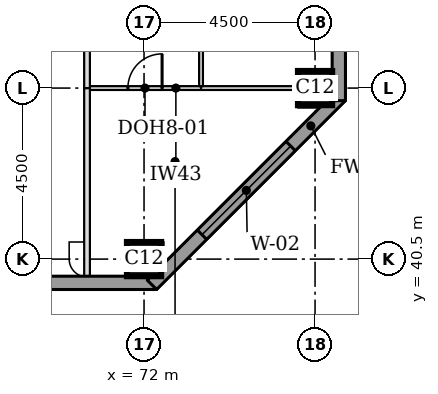
"""IFC4 building model, lengths in metres.
Left out: names, types, materials, properties, quantities, classifications, styles, units other than length and angle.
Written with IfcOpenShell. Run it as: python <this file> out.ifc"""

import sys

from ifc_helpers import new_model, si_unit, direction, frame, frame_2d, origin, origin_2d, place, context, subcontext, project, spatial, rectangle, extrude, element, fill, save


model = new_model("IFC4")
c1 = context("Model", 3, precision=1e-05, world=origin(), true_north=direction((0.0, 1.0)))
c2 = subcontext(c1, "Body", "Model", "MODEL_VIEW")
j1 = project(units=[si_unit("LENGTHUNIT", "METRE"), si_unit("PLANEANGLEUNIT", "RADIAN")], contexts=[c1])
p1 = place(None, origin())
s1 = spatial("IfcSite", under=j1, at=p1, CompositionType="ELEMENT")
p2 = place(p1, origin())
s2 = spatial("IfcBuilding", under=s1, at=p2, CompositionType="ELEMENT")
p3 = place(p2, frame((0.0, 0.0, 199.5)))
s3 = spatial("IfcBuildingStorey", under=s2, at=p3, CompositionType="ELEMENT", Elevation=199.5)
for number, where, z_axis, x_axis in (
    (1, (72.0, 40.5, 0.0), (0.0, 0.0, 1.0), (1.0, 0.0, 0.0)),
    (2, (76.5, 45.0, 0.0), (0.0, 0.0, 1.0), (1.0, 0.0, 0.0)),
):
    element("IfcColumn", number, at=place(p3, frame(where, z_axis=z_axis, x_axis=x_axis)), inside=s3, PredefinedType="COLUMN", context=c2, shape_type="SweptSolid", body=[
        extrude(rectangle(XDim=0.9, YDim=0.9, at=origin_2d()), origin(), (0.0, 0.0, 1.0), 3.7),
    ])
p4 = place(p3, frame((36.0, 39.875, 0.0), z_axis=(0.0, 0.0, 1.0), x_axis=(1.0, 0.0, 0.0)))
e3 = element("IfcWall", 3, at=p4, inside=s3, PredefinedType="STANDARD", context=c2, shape_type="SweptSolid", body=[
    extrude(rectangle(XDim=36.331, YDim=0.35, at=frame_2d((18.166, 0.0))), origin(), (0.0, 0.0, 1.0), 3.525),
])
p5 = place(p4, frame((5.1, 0.0, 0.9)))
e4 = element("IfcOpeningElement", 4, at=p5, cuts=e3, PredefinedType="OPENING", context=c2, shape_type="SweptSolid", body=[
    extrude(rectangle(XDim=3.3, YDim=1.9, at=frame_2d((1.65, 0.95))), frame((0.0, 0.185, 0.0), z_axis=(0.0, -1.0, 0.0), x_axis=(1.0, 0.0, 0.0)), (0.0, 0.0, 1.0), 0.37),
])
p6 = place(p4, frame((9.6, 0.0, 0.9)))
e5 = element("IfcOpeningElement", 5, at=p6, cuts=e3, PredefinedType="OPENING", context=c2, shape_type="SweptSolid", body=[
    extrude(rectangle(XDim=3.3, YDim=1.9, at=frame_2d((1.65, 0.95))), frame((0.0, 0.185, 0.0), z_axis=(0.0, -1.0, 0.0), x_axis=(1.0, 0.0, 0.0)), (0.0, 0.0, 1.0), 0.37),
])
p7 = place(p4, frame((14.1, 0.0, 0.9)))
e6 = element("IfcOpeningElement", 6, at=p7, cuts=e3, PredefinedType="OPENING", context=c2, shape_type="SweptSolid", body=[
    extrude(rectangle(XDim=3.3, YDim=1.9, at=frame_2d((1.65, 0.95))), frame((0.0, 0.185, 0.0), z_axis=(0.0, -1.0, 0.0), x_axis=(1.0, 0.0, 0.0)), (0.0, 0.0, 1.0), 0.37),
])
p8 = place(p4, frame((18.6, 0.0, 0.9)))
e7 = element("IfcOpeningElement", 7, at=p8, cuts=e3, PredefinedType="OPENING", context=c2, shape_type="SweptSolid", body=[
    extrude(rectangle(XDim=3.3, YDim=1.9, at=frame_2d((1.65, 0.95))), frame((0.0, 0.185, 0.0), z_axis=(0.0, -1.0, 0.0), x_axis=(1.0, 0.0, 0.0)), (0.0, 0.0, 1.0), 0.37),
])
p9 = place(p4, frame((23.1, 0.0, 0.9)))
e8 = element("IfcOpeningElement", 8, at=p9, cuts=e3, PredefinedType="OPENING", context=c2, shape_type="SweptSolid", body=[
    extrude(rectangle(XDim=3.3, YDim=1.9, at=frame_2d((1.65, 0.95))), frame((0.0, 0.185, 0.0), z_axis=(0.0, -1.0, 0.0), x_axis=(1.0, 0.0, 0.0)), (0.0, 0.0, 1.0), 0.37),
])
p10 = place(p4, frame((27.6, 0.0, 0.9)))
e9 = element("IfcOpeningElement", 9, at=p10, cuts=e3, PredefinedType="OPENING", context=c2, shape_type="SweptSolid", body=[
    extrude(rectangle(XDim=3.3, YDim=1.9, at=frame_2d((1.65, 0.95))), frame((0.0, 0.185, 0.0), z_axis=(0.0, -1.0, 0.0), x_axis=(1.0, 0.0, 0.0)), (0.0, 0.0, 1.0), 0.37),
])
p11 = place(p3, frame((72.208, 39.824, 0.0), z_axis=(0.0, 0.0, 1.0), x_axis=(0.707106781187, 0.707106781187, 0.0)))
e10 = element("IfcWall", 10, at=p11, inside=s3, PredefinedType="STANDARD", context=c2, shape_type="SweptSolid", body=[
    extrude(rectangle(XDim=7.027, YDim=0.35, at=frame_2d((3.513, 0.0))), origin(), (0.0, 0.0, 1.0), 3.525),
])
p12 = place(p11, frame((1.863, 0.0, 0.9)))
e11 = element("IfcOpeningElement", 11, at=p12, cuts=e10, PredefinedType="OPENING", context=c2, shape_type="SweptSolid", body=[
    extrude(rectangle(XDim=3.3, YDim=1.9, at=frame_2d((1.65, 0.95))), frame((0.0, 0.185, 0.0), z_axis=(0.0, -1.0, 0.0), x_axis=(1.0, 0.0, 0.0)), (0.0, 0.0, 1.0), 0.37),
])
p13 = place(p3, frame((77.125, 44.669, 0.0), z_axis=(0.0, 0.0, 1.0), x_axis=(0.0, 1.0, 0.0)))
e12 = element("IfcWall", 12, at=p13, inside=s3, PredefinedType="STANDARD", context=c2, shape_type="SweptSolid", body=[
    extrude(rectangle(XDim=32.163, YDim=0.35, at=frame_2d((16.081, 0.0))), origin(), (0.0, 0.0, 1.0), 3.525),
])
p14 = place(p13, frame((5.431, 0.0, 0.9)))
e13 = element("IfcOpeningElement", 13, at=p14, cuts=e12, PredefinedType="OPENING", context=c2, shape_type="SweptSolid", body=[
    extrude(rectangle(XDim=3.3, YDim=1.9, at=frame_2d((1.65, 0.95))), frame((0.0, 0.185, 0.0), z_axis=(0.0, -1.0, 0.0), x_axis=(1.0, 0.0, 0.0)), (0.0, 0.0, 1.0), 0.37),
])
p15 = place(p13, frame((9.931, 0.0, 0.9)))
e14 = element("IfcOpeningElement", 14, at=p15, cuts=e12, PredefinedType="OPENING", context=c2, shape_type="SweptSolid", body=[
    extrude(rectangle(XDim=3.3, YDim=1.9, at=frame_2d((1.65, 0.95))), frame((0.0, 0.185, 0.0), z_axis=(0.0, -1.0, 0.0), x_axis=(1.0, 0.0, 0.0)), (0.0, 0.0, 1.0), 0.37),
])
p16 = place(p13, frame((14.431, 0.0, 0.9)))
e15 = element("IfcOpeningElement", 15, at=p16, cuts=e12, PredefinedType="OPENING", context=c2, shape_type="SweptSolid", body=[
    extrude(rectangle(XDim=3.3, YDim=1.9, at=frame_2d((1.65, 0.95))), frame((0.0, 0.185, 0.0), z_axis=(0.0, -1.0, 0.0), x_axis=(1.0, 0.0, 0.0)), (0.0, 0.0, 1.0), 0.37),
])
p17 = place(p13, frame((18.931, 0.0, 0.9)))
e16 = element("IfcOpeningElement", 16, at=p17, cuts=e12, PredefinedType="OPENING", context=c2, shape_type="SweptSolid", body=[
    extrude(rectangle(XDim=3.3, YDim=1.9, at=frame_2d((1.65, 0.95))), frame((0.0, 0.185, 0.0), z_axis=(0.0, -1.0, 0.0), x_axis=(1.0, 0.0, 0.0)), (0.0, 0.0, 1.0), 0.37),
])
p18 = place(p13, frame((23.431, 0.0, 0.9)))
e17 = element("IfcOpeningElement", 17, at=p18, cuts=e12, PredefinedType="OPENING", context=c2, shape_type="SweptSolid", body=[
    extrude(rectangle(XDim=3.3, YDim=1.9, at=frame_2d((1.65, 0.95))), frame((0.0, 0.185, 0.0), z_axis=(0.0, -1.0, 0.0), x_axis=(1.0, 0.0, 0.0)), (0.0, 0.0, 1.0), 0.37),
])
p19 = place(p3, frame((70.575, 45.0, 0.0), z_axis=(0.0, 0.0, 1.0), x_axis=(1.0, 0.0, 0.0)))
e18 = element("IfcWall", 18, at=p19, inside=s3, PredefinedType="PARTITIONING", context=c2, shape_type="SweptSolid", body=[
    extrude(rectangle(XDim=2.925, YDim=0.1, at=frame_2d((1.462, 0.0))), origin(), (0.0, 0.0, 1.0), 3.096),
])
p20 = place(p19, frame((1.0, 0.0, 0.0)))
e19 = element("IfcOpeningElement", 19, at=p20, cuts=e18, PredefinedType="OPENING", context=c2, shape_type="SweptSolid", body=[
    extrude(rectangle(XDim=0.9, YDim=2.1, at=frame_2d((0.45, 1.05))), frame((0.0, 0.06, 0.0), z_axis=(0.0, -1.0, 0.0), x_axis=(1.0, 0.0, 0.0)), (0.0, 0.0, 1.0), 0.12),
])
p21 = place(p3, frame((73.5, 45.0, 0.0), z_axis=(0.0, 0.0, 1.0), x_axis=(1.0, 0.0, 0.0)))
e20 = element("IfcWall", 20, at=p21, inside=s3, PredefinedType="PARTITIONING", context=c2, shape_type="SweptSolid", body=[
    extrude(rectangle(XDim=2.55, YDim=0.1, at=frame_2d((1.275, 0.0))), origin(), (0.0, 0.0, 1.0), 3.096),
])
p22 = place(p3, frame((70.5, 40.05, 0.0), z_axis=(0.0, 0.0, 1.0), x_axis=(0.0, 1.0, 0.0)))
e21 = element("IfcWall", 21, at=p22, inside=s3, PredefinedType="PARTITIONING", context=c2, shape_type="SweptSolid", body=[
    extrude(rectangle(XDim=4.95, YDim=0.15, at=frame_2d((2.475, 0.0))), origin(), (0.0, 0.0, 1.0), 3.55),
])
p23 = place(p3, frame((70.5, 45.0, 0.0), z_axis=(0.0, 0.0, 1.0), x_axis=(0.0, 1.0, 0.0)))
e22 = element("IfcWall", 22, at=p23, inside=s3, PredefinedType="PARTITIONING", context=c2, shape_type="SweptSolid", body=[
    extrude(rectangle(XDim=24.0, YDim=0.15, at=frame_2d((12.0, 0.0))), origin(), (0.0, 0.0, 1.0), 3.55),
])
p24 = place(p23, frame((11.5, 0.0, 0.0)))
e23 = element("IfcOpeningElement", 23, at=p24, cuts=e22, PredefinedType="OPENING", context=c2, shape_type="SweptSolid", body=[
    extrude(rectangle(XDim=1.0, YDim=2.1, at=frame_2d((0.5, 1.05))), frame((0.0, 0.085, 0.0), z_axis=(0.0, -1.0, 0.0), x_axis=(1.0, 0.0, 0.0)), (0.0, 0.0, 1.0), 0.17),
])
p25 = place(p3, frame((73.5, 45.05, 0.0), z_axis=(0.0, 0.0, 1.0), x_axis=(0.0, 1.0, 0.0)))
e24 = element("IfcWall", 24, at=p25, inside=s3, PredefinedType="PARTITIONING", context=c2, shape_type="SweptSolid", body=[
    extrude(rectangle(XDim=4.45, YDim=0.1, at=frame_2d((2.225, 0.0))), origin(), (0.0, 0.0, 1.0), 3.55),
])
p26 = place(p25, frame((1.8, 0.0, 0.0)))
e25 = element("IfcOpeningElement", 25, at=p26, cuts=e24, PredefinedType="OPENING", context=c2, shape_type="SweptSolid", body=[
    extrude(rectangle(XDim=0.9, YDim=2.1, at=frame_2d((0.45, 1.05))), frame((0.0, 0.06, 0.0), z_axis=(0.0, -1.0, 0.0), x_axis=(1.0, 0.0, 0.0)), (0.0, 0.0, 1.0), 0.12),
])
p27 = place(p12, origin())
e26 = element("IfcWindow", 26, at=p27, inside=s3, PartitioningType="SINGLE_PANEL", PredefinedType="WINDOW", context=c2, shape_type="SweptSolid", body=[
    extrude(rectangle(XDim=3.3, YDim=1.9, at=frame_2d((1.65, 0.95))), frame((0.0, 0.085, 0.0), z_axis=(0.0, -1.0, 0.0), x_axis=(1.0, 0.0, 0.0)), (0.0, 0.0, 1.0), 0.06),
])
fill(e11, e26)
p28 = place(p20, origin())
e27 = element("IfcDoor", 27, at=p28, inside=s3, OperationType="SINGLE_SWING_RIGHT", PredefinedType="DOOR", context=c2, shape_type="SweptSolid", body=[
    extrude(rectangle(XDim=0.9, YDim=2.1, at=frame_2d((0.45, 1.05))), frame((0.0, 0.025, 0.0), z_axis=(0.0, -1.0, 0.0), x_axis=(1.0, 0.0, 0.0)), (0.0, 0.0, 1.0), 0.05),
])
fill(e19, e27)
save(model, sys.argv[1])
